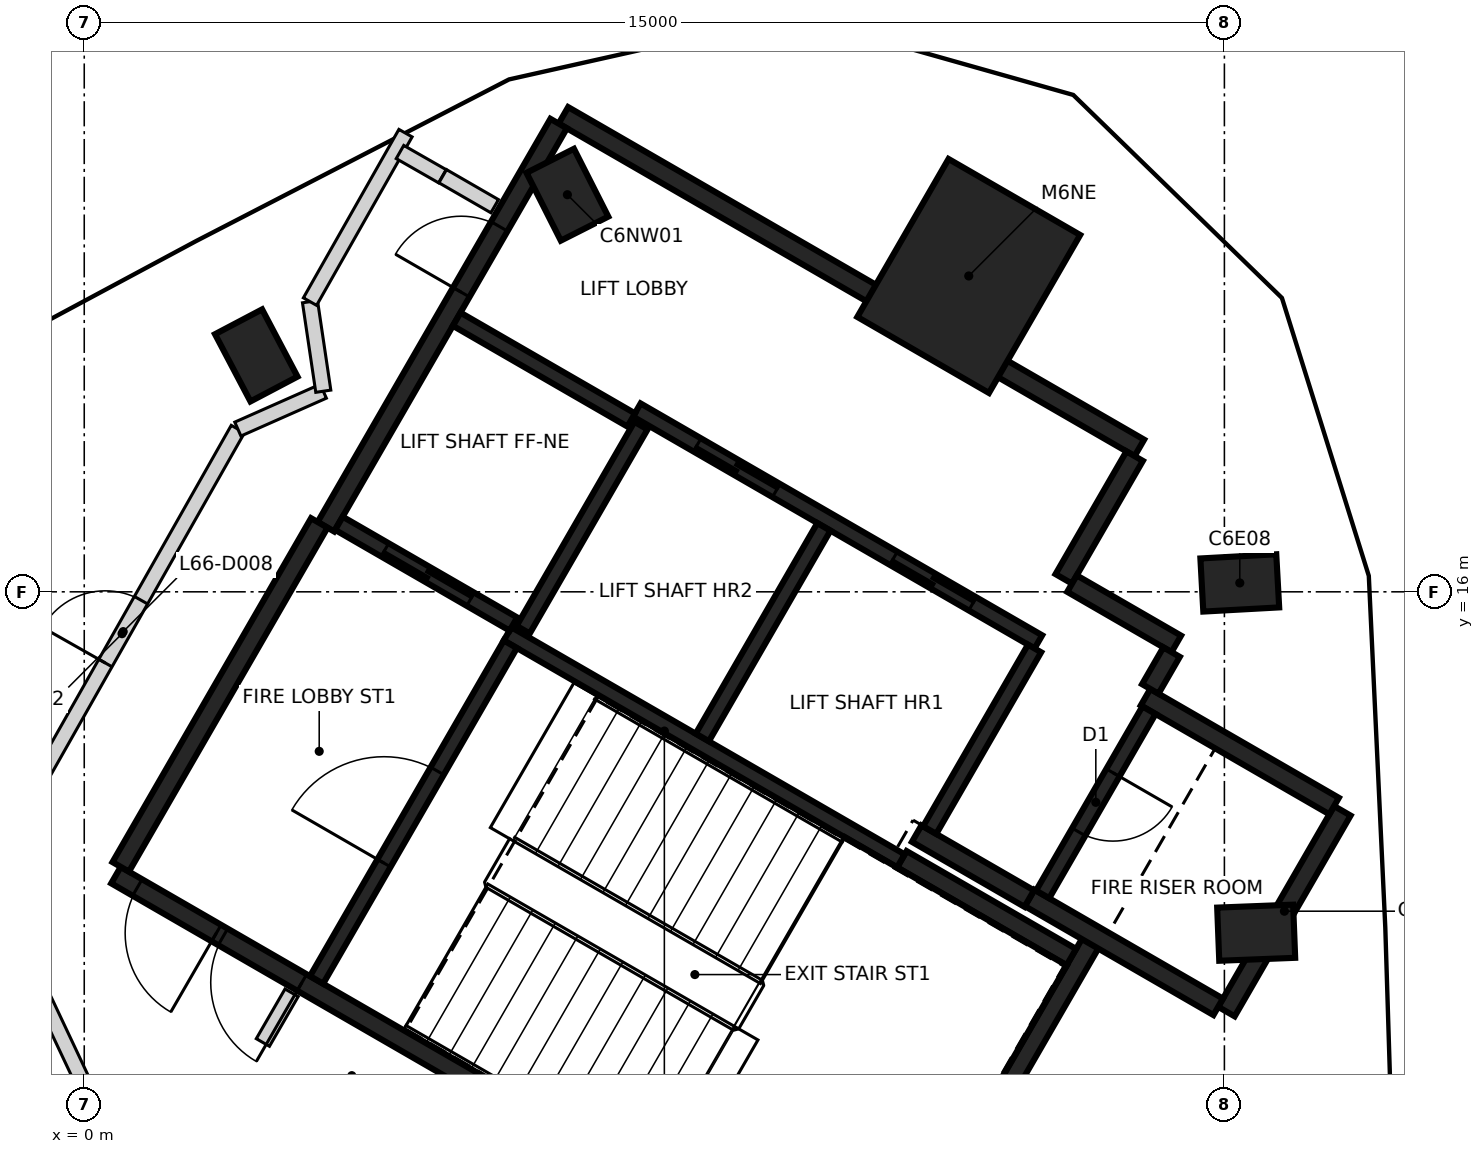
"""IFC4 building model, lengths in metres.
Left out: names, types, materials, properties, quantities, classifications, styles, units other than length and angle.
Written with IfcOpenShell. Run it as: python <this file> out.ifc"""

import sys

from ifc_helpers import new_model, si_unit, direction, frame, frame_2d, origin, origin_2d, place, context, subcontext, project, spatial, rectangle, extrude, element, fill, save


model = new_model("IFC4")
c1 = context("Model", 3, precision=1e-05, world=origin(), true_north=direction((0.0, 1.0)))
c2 = subcontext(c1, "Body", "Model", "MODEL_VIEW")
j1 = project(units=[si_unit("LENGTHUNIT", "METRE"), si_unit("PLANEANGLEUNIT", "RADIAN")], contexts=[c1])
p1 = place(None, origin())
s1 = spatial("IfcSite", under=j1, at=p1, CompositionType="ELEMENT")
p2 = place(p1, origin())
s2 = spatial("IfcBuilding", under=s1, at=p2, CompositionType="ELEMENT")
p3 = place(p2, frame((0.0, 0.0, 262.2)))
s3 = spatial("IfcBuildingStorey", under=s2, at=p3, CompositionType="ELEMENT", Elevation=262.2)
for number, where, z_axis, x_axis in (
    (1, (15.418, 11.515, -0.35), (0.0, 0.0, 1.0), (0.999, 0.039, 0.0)),
    (2, (15.202, 16.117, -0.35), (0.0, 0.0, 1.0), (0.998, 0.055, 0.0)),
    (3, (6.356, 21.224, -0.35), (0.0, 0.0, 1.0), (-0.452, 0.892, 0.0)),
    (4, (2.263, 19.11, -0.35), (0.0, 0.0, 1.0), (-0.466, 0.885, 0.0)),
):
    element("IfcColumn", number, at=place(p3, frame(where, z_axis=z_axis, x_axis=x_axis)), inside=s3, PredefinedType="COLUMN", context=c2, shape_type="SweptSolid", body=[
        extrude(rectangle(XDim=1.0, YDim=0.7, at=origin_2d()), origin(), (0.0, 0.0, 1.0), 3.6),
    ])
p4 = place(p3, frame((11.637, 20.155, -0.35), z_axis=(0.0, 0.0, 1.0), x_axis=(0.5, 0.866025403784, 0.0)))
e5 = element("IfcColumn", 5, at=p4, inside=s3, PredefinedType="COLUMN", context=c2, shape_type="SweptSolid", body=[
    extrude(rectangle(XDim=2.4, YDim=2.0, at=origin_2d()), origin(), (0.0, 0.0, 1.0), 3.6),
])
p5 = place(p3, frame((10.42, 6.498, 0.0), z_axis=(0.0, 0.0, 1.0), x_axis=(-0.866021906294, 0.500006057782, 0.0)))
e6 = element("IfcWall", 6, at=p5, inside=s3, PredefinedType="SHEAR", context=c2, shape_type="SweptSolid", body=[
    extrude(rectangle(XDim=11.55, YDim=0.25, at=frame_2d((5.775, 0.0))), origin(), (0.0, 0.0, 1.0), 3.25),
])
p6 = place(p5, frame((10.025, 0.0, 0.0)))
e7 = element("IfcOpeningElement", 7, at=p6, cuts=e6, PredefinedType="OPENING", context=c2, shape_type="SweptSolid", body=[
    extrude(rectangle(XDim=1.2, YDim=2.1, at=frame_2d((0.6, 1.05))), frame((0.0, 0.135, 0.0), z_axis=(0.0, -1.0, 0.0), x_axis=(1.0, 0.0, 0.0)), (0.0, 0.0, 1.0), 0.27),
])
p7 = place(p5, frame((8.725, 0.0, 0.0)))
e8 = element("IfcOpeningElement", 8, at=p7, cuts=e6, PredefinedType="OPENING", context=c2, shape_type="SweptSolid", body=[
    extrude(rectangle(XDim=1.2, YDim=2.1, at=frame_2d((0.6, 1.05))), frame((0.0, 0.135, 0.0), z_axis=(0.0, -1.0, 0.0), x_axis=(1.0, 0.0, 0.0)), (0.0, 0.0, 1.0), 0.27),
])
p8 = place(p3, frame((6.304, 22.269, 0.0), z_axis=(0.0, 0.0, 1.0), x_axis=(0.866022959057, -0.500004234368, 0.0)))
e9 = element("IfcWall", 9, at=p8, inside=s3, PredefinedType="SHEAR", context=c2, shape_type="SweptSolid", body=[
    extrude(rectangle(XDim=8.75, YDim=0.25, at=frame_2d((4.375, 0.0))), origin(), (0.0, 0.0, 1.0), 3.25),
])
p9 = place(p3, frame((3.179, 16.856, 0.0), z_axis=(0.0, 0.0, 1.0), x_axis=(0.500001955336, 0.866024274868, 0.0)))
e10 = element("IfcWall", 10, at=p9, inside=s3, PredefinedType="SHEAR", context=c2, shape_type="SweptSolid", body=[
    extrude(rectangle(XDim=6.125, YDim=0.25, at=frame_2d((3.062, 0.0))), origin(), (0.0, 0.0, 1.0), 3.25),
])
p10 = place(p9, frame((3.563, 0.0, 0.0)))
e11 = element("IfcOpeningElement", 11, at=p10, cuts=e10, PredefinedType="OPENING", context=c2, shape_type="SweptSolid", body=[
    extrude(rectangle(XDim=1.0, YDim=2.1, at=frame_2d((0.5, 1.05))), frame((0.0, 0.135, 0.0), z_axis=(0.0, -1.0, 0.0), x_axis=(1.0, 0.0, 0.0)), (0.0, 0.0, 1.0), 0.27),
])
p11 = place(p3, frame((0.48, 12.381, 0.0), z_axis=(0.0, 0.0, 1.0), x_axis=(0.49999885962, 0.866026062182, 0.0)))
e12 = element("IfcWall", 12, at=p11, inside=s3, PredefinedType="SHEAR", context=c2, shape_type="SweptSolid", body=[
    extrude(rectangle(XDim=5.225, YDim=0.25, at=frame_2d((2.612, 0.0))), origin(), (0.0, 0.0, 1.0), 3.25),
])
p12 = place(p3, frame((13.238, 11.378, 0.0), z_axis=(0.0, 0.0, 1.0), x_axis=(-0.500008851346, -0.866020293397, 0.0)))
e13 = element("IfcWall", 13, at=p12, inside=s3, PredefinedType="SHEAR", context=c2, shape_type="SweptSolid", body=[
    extrude(rectangle(XDim=5.51, YDim=0.25, at=frame_2d((2.755, 0.0))), origin(), (0.0, 0.0, 1.0), 3.25),
])
p13 = place(p3, frame((16.552, 13.119, 0.0), z_axis=(0.0, 0.0, 1.0), x_axis=(-0.499978833458, -0.866037623948, 0.0)))
e14 = element("IfcWall", 14, at=p13, inside=s3, PredefinedType="SHEAR", context=c2, shape_type="SweptSolid", body=[
    extrude(rectangle(XDim=3.05, YDim=0.25, at=frame_2d((1.525, 0.0))), origin(), (0.0, 0.0, 1.0), 3.25),
])
p14 = place(p3, frame((14.918, 10.54, 0.0), z_axis=(0.0, 0.0, 1.0), x_axis=(-0.866063538972, 0.499933942099, 0.0)))
e15 = element("IfcWall", 15, at=p14, inside=s3, PredefinedType="SHEAR", context=c2, shape_type="SweptSolid", body=[
    extrude(rectangle(XDim=2.865, YDim=0.25, at=frame_2d((1.432, 0.0))), origin(), (0.0, 0.0, 1.0), 3.25),
])
p15 = place(p3, frame((13.963, 14.614, 0.0), z_axis=(0.0, 0.0, 1.0), x_axis=(0.866042235819, -0.499970844928, 0.0)))
e16 = element("IfcWall", 16, at=p15, inside=s3, PredefinedType="SHEAR", context=c2, shape_type="SweptSolid", body=[
    extrude(rectangle(XDim=2.865, YDim=0.25, at=frame_2d((1.432, 0.0))), origin(), (0.0, 0.0, 1.0), 3.25),
])
p16 = place(p3, frame((10.757, 12.481, 0.0), z_axis=(0.0, 0.0, 1.0), x_axis=(0.866022940537, -0.500004266446, 0.0)))
e17 = element("IfcWall", 17, at=p16, inside=s3, PredefinedType="SHEAR", context=c2, shape_type="SweptSolid", body=[
    extrude(rectangle(XDim=2.575, YDim=0.25, at=frame_2d((1.287, 0.0))), origin(), (0.0, 0.0, 1.0), 3.25),
])
p17 = place(p3, frame((13.819, 17.785, 0.0), z_axis=(0.0, 0.0, 1.0), x_axis=(-0.500039802285, -0.866002422705, 0.0)))
e18 = element("IfcWall", 18, at=p17, inside=s3, PredefinedType="SHEAR", context=c2, shape_type="SweptSolid", body=[
    extrude(rectangle(XDim=1.865, YDim=0.25, at=frame_2d((0.932, 0.0))), origin(), (0.0, 0.0, 1.0), 3.25),
])
p18 = place(p3, frame((12.433, 11.964, 0.0), z_axis=(0.0, 0.0, 1.0), x_axis=(-0.866038183914, 0.499977863513, 0.0)))
e19 = element("IfcWall", 19, at=p18, inside=s3, PredefinedType="SHEAR", context=c2, shape_type="SweptSolid", body=[
    extrude(rectangle(XDim=1.71, YDim=0.25, at=frame_2d((0.855, 0.0))), origin(), (0.0, 0.0, 1.0), 3.25),
])
p19 = place(p3, frame((12.995, 16.108, 0.0), z_axis=(0.0, 0.0, 1.0), x_axis=(0.866044474677, -0.49996696679, 0.0)))
e20 = element("IfcWall", 20, at=p19, inside=s3, PredefinedType="SHEAR", context=c2, shape_type="SweptSolid", body=[
    extrude(rectangle(XDim=1.584, YDim=0.25, at=frame_2d((0.792, 0.0))), origin(), (0.0, 0.0, 1.0), 3.25),
])
p20 = place(p3, frame((14.305, 15.207, 0.0), z_axis=(0.0, 0.0, 1.0), x_axis=(-0.499848422343, -0.866112899501, 0.0)))
e21 = element("IfcWall", 21, at=p20, inside=s3, PredefinedType="SHEAR", context=c2, shape_type="SweptSolid", body=[
    extrude(rectangle(XDim=0.559, YDim=0.25, at=frame_2d((0.28, 0.0))), origin(), (0.0, 0.0, 1.0), 3.25),
])
p21 = place(p3, frame((12.552, 15.342, 0.0), z_axis=(0.0, 0.0, 1.0), x_axis=(-0.866030299012, 0.499991521122, 0.0)))
e22 = element("IfcWall", 22, at=p21, inside=s3, PredefinedType="SHEAR", context=c2, shape_type="SweptSolid", body=[
    extrude(rectangle(XDim=6.1, YDim=0.2, at=frame_2d((3.05, 0.0))), origin(), (0.0, 0.0, 1.0), 3.25),
])
p22 = place(p21, frame((1.0, 0.0, 0.0)))
e23 = element("IfcOpeningElement", 23, at=p22, cuts=e22, PredefinedType="OPENING", context=c2, shape_type="SweptSolid", body=[
    extrude(rectangle(XDim=1.2, YDim=2.1, at=frame_2d((0.6, 1.05))), frame((0.0, 0.11, 0.0), z_axis=(0.0, -1.0, 0.0), x_axis=(1.0, 0.0, 0.0)), (0.0, 0.0, 1.0), 0.22),
])
p23 = place(p21, frame((3.982, 0.0, 0.0)))
e24 = element("IfcOpeningElement", 24, at=p23, cuts=e22, PredefinedType="OPENING", context=c2, shape_type="SweptSolid", body=[
    extrude(rectangle(XDim=1.2, YDim=2.1, at=frame_2d((0.6, 1.05))), frame((0.0, 0.11, 0.0), z_axis=(0.0, -1.0, 0.0), x_axis=(1.0, 0.0, 0.0)), (0.0, 0.0, 1.0), 0.22),
])
p24 = place(p3, frame((10.743, 12.46, 0.0), z_axis=(0.0, 0.0, 1.0), x_axis=(-0.866018848283, 0.500011354289, 0.0)))
e25 = element("IfcWall", 25, at=p24, inside=s3, PredefinedType="SHEAR", context=c2, shape_type="SweptSolid", body=[
    extrude(rectangle(XDim=5.974, YDim=0.2, at=frame_2d((2.987, 0.0))), origin(), (0.0, 0.0, 1.0), 3.25),
])
p25 = place(p3, frame((3.057, 10.895, 0.0), z_axis=(0.0, 0.0, 1.0), x_axis=(0.500027839223, 0.866009330205, 0.0)))
e26 = element("IfcWall", 26, at=p25, inside=s3, PredefinedType="SHEAR", context=c2, shape_type="SweptSolid", body=[
    extrude(rectangle(XDim=5.098, YDim=0.2, at=frame_2d((2.549, 0.0))), origin(), (0.0, 0.0, 1.0), 3.25),
])
p26 = place(p25, frame((1.774, 0.0, 0.0)))
e27 = element("IfcOpeningElement", 27, at=p26, cuts=e26, PredefinedType="OPENING", context=c2, shape_type="SweptSolid", body=[
    extrude(rectangle(XDim=1.4, YDim=2.1, at=frame_2d((0.7, 1.05))), frame((0.0, 0.11, 0.0), z_axis=(0.0, -1.0, 0.0), x_axis=(1.0, 0.0, 0.0)), (0.0, 0.0, 1.0), 0.22),
])
p27 = place(p3, frame((8.132, 14.084, 0.0), z_axis=(0.0, 0.0, 1.0), x_axis=(0.500030834389, 0.86600760081, 0.0)))
e28 = element("IfcWall", 28, at=p27, inside=s3, PredefinedType="SHEAR", context=c2, shape_type="SweptSolid", body=[
    extrude(rectangle(XDim=3.198, YDim=0.2, at=frame_2d((1.599, 0.0))), origin(), (0.0, 0.0, 1.0), 3.25),
])
p28 = place(p3, frame((14.008, 14.442, 0.0), z_axis=(0.0, 0.0, 1.0), x_axis=(-0.499986818241, -0.866033014143, 0.0)))
e29 = element("IfcWall", 29, at=p28, inside=s3, PredefinedType="SHEAR", context=c2, shape_type="SweptSolid", body=[
    extrude(rectangle(XDim=2.798, YDim=0.2, at=frame_2d((1.399, 0.0))), origin(), (0.0, 0.0, 1.0), 3.25),
])
p29 = place(p28, frame((0.949, 0.0, 0.0)))
e30 = element("IfcOpeningElement", 30, at=p29, cuts=e29, PredefinedType="OPENING", context=c2, shape_type="SweptSolid", body=[
    extrude(rectangle(XDim=0.9, YDim=2.1, at=frame_2d((0.45, 1.05))), frame((0.0, 0.11, 0.0), z_axis=(0.0, -1.0, 0.0), x_axis=(1.0, 0.0, 0.0)), (0.0, 0.0, 1.0), 0.22),
])
p30 = place(p3, frame((12.502, 15.255, 0.0), z_axis=(0.0, 0.0, 1.0), x_axis=(-0.499965018551, -0.866045599391, 0.0)))
e31 = element("IfcWall", 31, at=p30, inside=s3, PredefinedType="SHEAR", context=c2, shape_type="SweptSolid", body=[
    extrude(rectangle(XDim=2.759, YDim=0.2, at=frame_2d((1.379, 0.0))), origin(), (0.0, 0.0, 1.0), 3.25),
])
p31 = place(p3, frame((7.324, 18.187, 0.0), z_axis=(0.0, 0.0, 1.0), x_axis=(-0.499967891604, -0.866043940782, 0.0)))
e32 = element("IfcWall", 32, at=p31, inside=s3, PredefinedType="SHEAR", context=c2, shape_type="SweptSolid", body=[
    extrude(rectangle(XDim=3.1, YDim=0.2, at=frame_2d((1.55, 0.0))), origin(), (0.0, 0.0, 1.0), 3.25),
])
p32 = place(p3, frame((5.646, 15.576, 0.0), z_axis=(0.0, 0.0, 1.0), x_axis=(-0.866018407898, 0.500012117035, 0.0)))
e33 = element("IfcWall", 33, at=p32, inside=s3, PredefinedType="SHEAR", context=c2, shape_type="SweptSolid", body=[
    extrude(rectangle(XDim=2.651, YDim=0.2, at=frame_2d((1.325, 0.0))), origin(), (0.0, 0.0, 1.0), 3.25),
])
p33 = place(p32, frame((0.652, 0.0, 0.0)))
e34 = element("IfcOpeningElement", 34, at=p33, cuts=e33, PredefinedType="OPENING", context=c2, shape_type="SweptSolid", body=[
    extrude(rectangle(XDim=1.3, YDim=2.1, at=frame_2d((0.65, 1.05))), frame((0.0, 0.11, 0.0), z_axis=(0.0, -1.0, 0.0), x_axis=(1.0, 0.0, 0.0)), (0.0, 0.0, 1.0), 0.22),
])
p34 = place(p3, frame((7.196, 18.26, 0.0), z_axis=(0.0, 0.0, 1.0), x_axis=(-0.866018407898, 0.500012117035, 0.0)))
e35 = element("IfcWall", 35, at=p34, inside=s3, PredefinedType="SHEAR", context=c2, shape_type="SweptSolid", body=[
    extrude(rectangle(XDim=2.651, YDim=0.2, at=frame_2d((1.325, 0.0))), origin(), (0.0, 0.0, 1.0), 3.25),
])
p35 = place(p3, frame((-1.06, 11.76, 0.0), z_axis=(0.0, 0.0, 1.0), x_axis=(0.426549824954, -0.904464066081, 0.0)))
e36 = element("IfcWall", 36, at=p35, inside=s3, PredefinedType="PARTITIONING", context=c2, shape_type="SweptSolid", body=[
    extrude(rectangle(XDim=5.747, YDim=0.2, at=frame_2d((2.873, 0.0))), origin(), (0.0, 0.0, 1.0), 3.25),
])
p36 = place(p3, frame((-1.027, 12.757, 0.0), z_axis=(0.0, 0.0, 1.0), x_axis=(0.492663063759, 0.870220147783, 0.0)))
e37 = element("IfcWall", 37, at=p36, inside=s3, PredefinedType="PARTITIONING", context=c2, shape_type="SweptSolid", body=[
    extrude(rectangle(XDim=6.187, YDim=0.2, at=frame_2d((3.094, 0.0))), origin(), (0.0, 0.0, 1.0), 3.25),
])
p37 = place(p36, frame((2.65, 0.0, 0.0)))
e38 = element("IfcOpeningElement", 38, at=p37, cuts=e37, PredefinedType="OPENING", context=c2, shape_type="SweptSolid", body=[
    extrude(rectangle(XDim=0.95, YDim=2.1, at=frame_2d((0.475, 1.05))), frame((0.0, 0.11, 0.0), z_axis=(0.0, -1.0, 0.0), x_axis=(1.0, 0.0, 0.0)), (0.0, 0.0, 1.0), 0.22),
])
p38 = place(p3, frame((2.021, 18.141, 0.0), z_axis=(0.0, 0.0, 1.0), x_axis=(0.914343087003, 0.404940389748, 0.0)))
e39 = element("IfcWall", 39, at=p38, inside=s3, PredefinedType="PARTITIONING", context=c2, shape_type="SweptSolid", body=[
    extrude(rectangle(XDim=1.229, YDim=0.2, at=frame_2d((0.615, 0.0))), origin(), (0.0, 0.0, 1.0), 3.25),
])
p39 = place(p3, frame((2.35, 10.071, 0.0), z_axis=(0.0, 0.0, 1.0), x_axis=(0.500309905322, 0.865846405916, 0.0)))
e40 = element("IfcWall", 40, at=p39, inside=s3, PredefinedType="PARTITIONING", context=c2, shape_type="SweptSolid", body=[
    extrude(rectangle(XDim=0.755, YDim=0.2, at=frame_2d((0.378, 0.0))), origin(), (0.0, 0.0, 1.0), 3.25),
])
p40 = place(p3, frame((2.97, 19.817, 0.0), z_axis=(0.0, 0.0, 1.0), x_axis=(0.146986994932, -0.989138424752, 0.0)))
e41 = element("IfcWall", 41, at=p40, inside=s3, PredefinedType="PARTITIONING", context=c2, shape_type="SweptSolid", body=[
    extrude(rectangle(XDim=1.191, YDim=0.2, at=frame_2d((0.595, 0.0))), origin(), (0.0, 0.0, 1.0), 2.35),
])
p41 = place(p3, frame((2.97, 19.818, 0.0), z_axis=(0.0, 0.0, 1.0), x_axis=(0.493215654548, 0.86990707441, 0.0)))
e42 = element("IfcWall", 42, at=p41, inside=s3, PredefinedType="PARTITIONING", context=c2, shape_type="SweptSolid", body=[
    extrude(rectangle(XDim=2.548, YDim=0.2, at=frame_2d((1.274, 0.0))), origin(), (0.0, 0.0, 1.0), 3.25),
])
p42 = place(p3, frame((4.154, 21.786, 0.0), z_axis=(0.0, 0.0, 1.0), x_axis=(0.868196374619, -0.496220772539, 0.0)))
e43 = element("IfcWall", 43, at=p42, inside=s3, PredefinedType="PARTITIONING", context=c2, shape_type="SweptSolid", body=[
    extrude(rectangle(XDim=0.643, YDim=0.2, at=frame_2d((0.321, 0.0))), origin(), (0.0, 0.0, 1.0), 3.25),
])
p43 = place(p3, frame((4.716, 21.468, 0.0), z_axis=(0.0, 0.0, 1.0), x_axis=(0.865912682783, -0.500195187698, 0.0)))
e44 = element("IfcWall", 44, at=p43, inside=s3, PredefinedType="PARTITIONING", context=c2, shape_type="SweptSolid", body=[
    extrude(rectangle(XDim=0.79, YDim=0.2, at=frame_2d((0.395, 0.0))), origin(), (0.0, 0.0, 1.0), 3.25),
])
p44 = place(p33, origin())
e45 = element("IfcDoor", 45, at=p44, inside=s3, OperationType="SLIDING_TO_LEFT", PredefinedType="DOOR", context=c2, shape_type="SweptSolid", body=[
    extrude(rectangle(XDim=1.3, YDim=2.1, at=frame_2d((0.65, 1.05))), frame((0.0, 0.025, 0.0), z_axis=(0.0, -1.0, 0.0), x_axis=(1.0, 0.0, 0.0)), (0.0, 0.0, 1.0), 0.05),
])
fill(e34, e45)
p45 = place(p22, origin())
e46 = element("IfcDoor", 46, at=p45, inside=s3, OperationType="DOUBLE_DOOR_SLIDING", PredefinedType="DOOR", context=c2, shape_type="SweptSolid", body=[
    extrude(rectangle(XDim=1.2, YDim=2.1, at=frame_2d((0.6, 1.05))), frame((0.0, 0.025, 0.0), z_axis=(0.0, -1.0, 0.0), x_axis=(1.0, 0.0, 0.0)), (0.0, 0.0, 1.0), 0.05),
])
fill(e23, e46)
p46 = place(p23, origin())
e47 = element("IfcDoor", 47, at=p46, inside=s3, OperationType="DOUBLE_DOOR_SLIDING", PredefinedType="DOOR", context=c2, shape_type="SweptSolid", body=[
    extrude(rectangle(XDim=1.2, YDim=2.1, at=frame_2d((0.6, 1.05))), frame((0.0, 0.025, 0.0), z_axis=(0.0, -1.0, 0.0), x_axis=(1.0, 0.0, 0.0)), (0.0, 0.0, 1.0), 0.05),
])
fill(e24, e47)
p47 = place(p10, origin())
e48 = element("IfcDoor", 48, at=p47, inside=s3, OperationType="SINGLE_SWING_LEFT", PredefinedType="DOOR", context=c2, shape_type="SweptSolid", body=[
    extrude(rectangle(XDim=1.0, YDim=2.1, at=frame_2d((0.5, 1.05))), frame((0.0, 0.025, 0.0), z_axis=(0.0, -1.0, 0.0), x_axis=(1.0, 0.0, 0.0)), (0.0, 0.0, 1.0), 0.05),
])
fill(e11, e48)
p48 = place(p6, origin())
e49 = element("IfcDoor", 49, at=p48, inside=s3, OperationType="SINGLE_SWING_LEFT", PredefinedType="DOOR", context=c2, shape_type="SweptSolid", body=[
    extrude(rectangle(XDim=1.2, YDim=2.1, at=frame_2d((0.6, 1.05))), frame((0.0, 0.025, 0.0), z_axis=(0.0, -1.0, 0.0), x_axis=(1.0, 0.0, 0.0)), (0.0, 0.0, 1.0), 0.05),
])
fill(e7, e49)
p49 = place(p7, origin())
e50 = element("IfcDoor", 50, at=p49, inside=s3, OperationType="SINGLE_SWING_RIGHT", PredefinedType="DOOR", context=c2, shape_type="SweptSolid", body=[
    extrude(rectangle(XDim=1.2, YDim=2.1, at=frame_2d((0.6, 1.05))), frame((0.0, 0.025, 0.0), z_axis=(0.0, -1.0, 0.0), x_axis=(1.0, 0.0, 0.0)), (0.0, 0.0, 1.0), 0.05),
])
fill(e8, e50)
p50 = place(p26, origin())
e51 = element("IfcDoor", 51, at=p50, inside=s3, OperationType="SINGLE_SWING_LEFT", PredefinedType="DOOR", context=c2, shape_type="SweptSolid", body=[
    extrude(rectangle(XDim=1.4, YDim=2.1, at=frame_2d((0.7, 1.05))), frame((0.0, 0.025, 0.0), z_axis=(0.0, -1.0, 0.0), x_axis=(1.0, 0.0, 0.0)), (0.0, 0.0, 1.0), 0.05),
])
fill(e27, e51)
p51 = place(p29, origin())
e52 = element("IfcDoor", 52, at=p51, inside=s3, OperationType="SINGLE_SWING_RIGHT", PredefinedType="DOOR", context=c2, shape_type="SweptSolid", body=[
    extrude(rectangle(XDim=0.9, YDim=2.1, at=frame_2d((0.45, 1.05))), frame((0.0, 0.025, 0.0), z_axis=(0.0, -1.0, 0.0), x_axis=(1.0, 0.0, 0.0)), (0.0, 0.0, 1.0), 0.05),
])
fill(e30, e52)
p52 = place(p37, origin())
e53 = element("IfcDoor", 53, at=p52, inside=s3, OperationType="SINGLE_SWING_LEFT", PredefinedType="DOOR", context=c2, shape_type="SweptSolid", body=[
    extrude(rectangle(XDim=0.95, YDim=2.1, at=frame_2d((0.475, 1.05))), frame((0.0, 0.025, 0.0), z_axis=(0.0, -1.0, 0.0), x_axis=(1.0, 0.0, 0.0)), (0.0, 0.0, 1.0), 0.05),
])
fill(e38, e53)
save(model, sys.argv[1])
